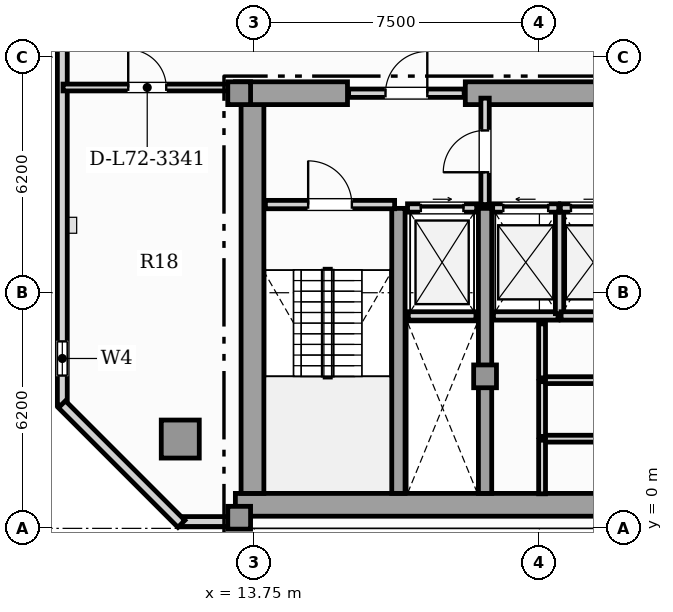
"""IFC4 building model, lengths in metres.
Left out: names, types, materials, properties, quantities, classifications, styles, units other than length and angle.
Written with IfcOpenShell. Run it as: python <this file> out.ifc"""

import sys

from ifc_helpers import new_model, si_unit, direction, frame, frame_2d, origin, origin_2d, place, context, subcontext, project, spatial, rectangle, hollow_rectangle, extrude, element, fill, save


model = new_model("IFC4")
c1 = context("Model", 3, precision=1e-05, world=origin(), true_north=direction((0.0, 1.0)))
c2 = subcontext(c1, "Body", "Model", "MODEL_VIEW")
j1 = project(units=[si_unit("LENGTHUNIT", "METRE"), si_unit("PLANEANGLEUNIT", "RADIAN")], contexts=[c1])
p1 = place(None, origin())
s1 = spatial("IfcSite", under=j1, at=p1, CompositionType="ELEMENT")
p2 = place(p1, origin())
s2 = spatial("IfcBuilding", under=s1, at=p2, CompositionType="ELEMENT")
p3 = place(p2, frame((0.0, 0.0, 292.6)))
s3 = spatial("IfcBuildingStorey", under=s2, at=p3, CompositionType="ELEMENT", Elevation=292.6)
p4 = place(p3, frame((13.25, 0.62, 0.0), z_axis=(0.0, 0.0, 1.0), x_axis=(1.0, 0.0, 0.0)))
e1 = element("IfcWall", 1, at=p4, inside=s3, PredefinedType="SHEAR", context=c2, shape_type="SweptSolid", body=[
    extrude(rectangle(XDim=31.0, YDim=0.6, at=frame_2d((15.5, 0.0))), origin(), (0.0, 0.0, 1.0), 3.65),
])
p5 = place(p3, frame((13.7, 0.92, 0.0), z_axis=(0.0, 0.0, 1.0), x_axis=(0.0, 1.0, 0.0)))
e2 = element("IfcWall", 2, at=p5, inside=s3, PredefinedType="SHEAR", context=c2, shape_type="SweptSolid", body=[
    extrude(rectangle(XDim=10.53, YDim=0.6, at=frame_2d((5.265, 0.0))), origin(), (0.0, 0.0, 1.0), 3.65),
])
p6 = place(p3, frame((13.25, 11.45, 0.0), z_axis=(0.0, 0.0, 1.0), x_axis=(1.0, 0.0, 0.0)))
e3 = element("IfcWall", 3, at=p6, inside=s3, PredefinedType="SHEAR", context=c2, shape_type="SweptSolid", body=[
    extrude(rectangle(XDim=2.95, YDim=0.6, at=frame_2d((1.475, 0.0))), origin(), (0.0, 0.0, 1.0), 3.65),
])
p7 = place(p3, frame((19.3, 11.45, 0.0), z_axis=(0.0, 0.0, 1.0), x_axis=(1.0, 0.0, 0.0)))
e4 = element("IfcWall", 4, at=p7, inside=s3, PredefinedType="SHEAR", context=c2, shape_type="SweptSolid", body=[
    extrude(rectangle(XDim=7.3, YDim=0.6, at=frame_2d((3.65, 0.0))), origin(), (0.0, 0.0, 1.0), 3.65),
])
for number, where, z_axis, x_axis in (
    (5, (17.54, 0.92, 0.0), (0.0, 0.0, 1.0), (0.0, 1.0, 0.0)),
    (6, (19.82, 0.92, 0.0), (0.0, 0.0, 1.0), (0.0, 1.0, 0.0)),
):
    element("IfcWall", number, at=place(p3, frame(where, z_axis=z_axis, x_axis=x_axis)), inside=s3, PredefinedType="SHEAR", context=c2, shape_type="SweptSolid", body=[
        extrude(rectangle(XDim=7.5, YDim=0.35, at=frame_2d((3.75, 0.0))), origin(), (0.0, 0.0, 1.0), 3.65),
    ])
for number, where, z_axis, x_axis in (
    (7, (13.35, 0.28, 0.0), (0.0, 0.0, 1.0), (1.0, 0.0, 0.0)),
    (8, (13.35, 11.45, 0.0), (0.0, 0.0, 1.0), (1.0, 0.0, 0.0)),
    (9, (19.82, 4.0, 0.0), (0.0, 0.0, 1.0), (1.0, 0.0, 0.0)),
):
    element("IfcColumn", number, at=place(p3, frame(where, z_axis=z_axis, x_axis=x_axis)), inside=s3, PredefinedType="COLUMN", context=c2, shape_type="SweptSolid", body=[
        extrude(rectangle(XDim=0.6, YDim=0.6, at=origin_2d()), origin(), (0.0, 0.0, 1.0), 3.85),
    ])
p8 = place(p3, frame((11.8, 2.35, 0.0), z_axis=(0.0, 0.0, 1.0), x_axis=(1.0, 0.0, 0.0)))
e10 = element("IfcColumn", 10, at=p8, inside=s3, PredefinedType="USERDEFINED", context=c2, shape_type="SweptSolid", body=[
    extrude(hollow_rectangle(XDim=1.0, YDim=1.0, WallThickness=0.06, at=origin_2d()), origin(), (0.0, 0.0, 1.0), 3.85),
])
p9 = place(p3, frame((11.806, 0.18, 0.0), z_axis=(0.0, 0.0, 1.0), x_axis=(1.0, 0.0, 0.0)))
e11 = element("IfcWall", 11, at=p9, inside=s3, PredefinedType="SOLIDWALL", context=c2, shape_type="SweptSolid", body=[
    extrude(rectangle(XDim=1.444, YDim=0.26, at=frame_2d((0.722, 0.0))), origin(), (0.0, 0.0, 1.0), 3.65),
])
p10 = place(p3, frame((8.696, 16.718, 0.0), z_axis=(0.0, 0.0, 1.0), x_axis=(0.0, -1.0, 0.0)))
e12 = element("IfcWall", 12, at=p10, inside=s3, PredefinedType="SOLIDWALL", context=c2, shape_type="SweptSolid", body=[
    extrude(rectangle(XDim=13.478, YDim=0.26, at=frame_2d((6.739, 0.0))), origin(), (0.0, 0.0, 1.0), 3.65),
])
p11 = place(p10, frame((11.798, 0.0, 0.95)))
e13 = element("IfcOpeningElement", 13, at=p11, cuts=e12, PredefinedType="OPENING", context=c2, shape_type="SweptSolid", body=[
    extrude(rectangle(XDim=0.9, YDim=1.5, at=frame_2d((0.45, 0.75))), frame((0.0, 0.14, 0.0), z_axis=(0.0, -1.0, 0.0), x_axis=(1.0, 0.0, 0.0)), (0.0, 0.0, 1.0), 0.28),
])
p12 = place(p3, frame((8.687, 3.264, 0.0), z_axis=(0.0, 0.0, 1.0), x_axis=(0.707106781187, -0.707106781187, 0.0)))
e14 = element("IfcWall", 14, at=p12, inside=s3, PredefinedType="SOLIDWALL", context=c2, shape_type="SweptSolid", body=[
    extrude(rectangle(XDim=4.446, YDim=0.26, at=frame_2d((2.223, 0.0))), origin(), (0.0, 0.0, 1.0), 3.65),
])
p13 = place(p3, frame((17.8, 5.59, 0.0), z_axis=(0.0, 0.0, 1.0), x_axis=(1.0, 0.0, 0.0)))
e15 = element("IfcWall", 15, at=p13, inside=s3, PredefinedType="SOLIDWALL", context=c2, shape_type="SweptSolid", body=[
    extrude(rectangle(XDim=1.78, YDim=0.22, at=frame_2d((0.89, 0.0))), origin(), (0.0, 0.0, 1.0), 3.65),
])
p14 = place(p3, frame((17.78, 8.43, 0.0), z_axis=(0.0, 0.0, 1.0), x_axis=(1.0, 0.0, 0.0)))
e16 = element("IfcWall", 16, at=p14, inside=s3, PredefinedType="SOLIDWALL", context=c2, shape_type="SweptSolid", body=[
    extrude(rectangle(XDim=1.82, YDim=0.22, at=frame_2d((0.91, 0.0))), origin(), (0.0, 0.0, 1.0), 3.65),
])
p15 = place(p14, frame((0.35, 0.0, 0.0)))
e17 = element("IfcOpeningElement", 17, at=p15, cuts=e16, PredefinedType="OPENING", context=c2, shape_type="SweptSolid", body=[
    extrude(rectangle(XDim=1.12, YDim=2.25, at=frame_2d((0.56, 1.125))), frame((0.0, 0.12, 0.0), z_axis=(0.0, -1.0, 0.0), x_axis=(1.0, 0.0, 0.0)), (0.0, 0.0, 1.0), 0.24),
])
p16 = place(p3, frame((20.04, 5.59, 0.0), z_axis=(0.0, 0.0, 1.0), x_axis=(1.0, 0.0, 0.0)))
e18 = element("IfcWall", 18, at=p16, inside=s3, PredefinedType="SOLIDWALL", context=c2, shape_type="SweptSolid", body=[
    extrude(rectangle(XDim=1.7, YDim=0.22, at=frame_2d((0.85, 0.0))), origin(), (0.0, 0.0, 1.0), 3.65),
])
p17 = place(p3, frame((21.78, 5.65, 0.0), z_axis=(0.0, 0.0, 1.0), x_axis=(0.0, 1.0, 0.0)))
e19 = element("IfcWall", 19, at=p17, inside=s3, PredefinedType="SOLIDWALL", context=c2, shape_type="SweptSolid", body=[
    extrude(rectangle(XDim=2.7, YDim=0.22, at=frame_2d((1.35, 0.0))), origin(), (0.0, 0.0, 1.0), 3.65),
])
p18 = place(p3, frame((20.02, 8.43, 0.0), z_axis=(0.0, 0.0, 1.0), x_axis=(1.0, 0.0, 0.0)))
e20 = element("IfcWall", 20, at=p18, inside=s3, PredefinedType="SOLIDWALL", context=c2, shape_type="SweptSolid", body=[
    extrude(rectangle(XDim=1.74, YDim=0.22, at=frame_2d((0.87, 0.0))), origin(), (0.0, 0.0, 1.0), 3.65),
])
p19 = place(p18, frame((0.28, 0.0, 0.0)))
e21 = element("IfcOpeningElement", 21, at=p19, cuts=e20, PredefinedType="OPENING", context=c2, shape_type="SweptSolid", body=[
    extrude(rectangle(XDim=1.18, YDim=2.2, at=frame_2d((0.59, 1.1))), frame((0.0, 0.12, 0.0), z_axis=(0.0, -1.0, 0.0), x_axis=(1.0, 0.0, 0.0)), (0.0, 0.0, 1.0), 0.24),
])
p20 = place(p3, frame((21.82, 5.59, 0.0), z_axis=(0.0, 0.0, 1.0), x_axis=(1.0, 0.0, 0.0)))
e22 = element("IfcWall", 22, at=p20, inside=s3, PredefinedType="SOLIDWALL", context=c2, shape_type="SweptSolid", body=[
    extrude(rectangle(XDim=1.7, YDim=0.22, at=frame_2d((0.85, 0.0))), origin(), (0.0, 0.0, 1.0), 3.65),
])
p21 = place(p3, frame((21.8, 8.43, 0.0), z_axis=(0.0, 0.0, 1.0), x_axis=(1.0, 0.0, 0.0)))
e23 = element("IfcWall", 23, at=p21, inside=s3, PredefinedType="SOLIDWALL", context=c2, shape_type="SweptSolid", body=[
    extrude(rectangle(XDim=1.74, YDim=0.22, at=frame_2d((0.87, 0.0))), origin(), (0.0, 0.0, 1.0), 3.65),
])
p22 = place(p21, frame((0.28, 0.0, 0.0)))
e24 = element("IfcOpeningElement", 24, at=p22, cuts=e23, PredefinedType="OPENING", context=c2, shape_type="SweptSolid", body=[
    extrude(rectangle(XDim=1.18, YDim=2.2, at=frame_2d((0.59, 1.1))), frame((0.0, 0.12, 0.0), z_axis=(0.0, -1.0, 0.0), x_axis=(1.0, 0.0, 0.0)), (0.0, 0.0, 1.0), 0.24),
])
p23 = place(p3, frame((14.04, 8.52, 0.0), z_axis=(0.0, 0.0, 1.0), x_axis=(1.0, 0.0, 0.0)))
e25 = element("IfcWall", 25, at=p23, inside=s3, PredefinedType="SOLIDWALL", context=c2, shape_type="SweptSolid", body=[
    extrude(rectangle(XDim=3.4, YDim=0.22, at=frame_2d((1.7, 0.0))), origin(), (0.0, 0.0, 1.0), 3.65),
])
p24 = place(p23, frame((1.125, 0.0, 0.0)))
e26 = element("IfcOpeningElement", 26, at=p24, cuts=e25, PredefinedType="OPENING", context=c2, shape_type="SweptSolid", body=[
    extrude(rectangle(XDim=1.15, YDim=2.2, at=frame_2d((0.575, 1.1))), frame((0.0, 0.12, 0.0), z_axis=(0.0, -1.0, 0.0), x_axis=(1.0, 0.0, 0.0)), (0.0, 0.0, 1.0), 0.24),
])
p25 = place(p3, frame((19.82, 8.52, 0.0), z_axis=(0.0, 0.0, 1.0), x_axis=(0.0, 1.0, 0.0)))
e27 = element("IfcWall", 27, at=p25, inside=s3, PredefinedType="SOLIDWALL", context=c2, shape_type="SweptSolid", body=[
    extrude(rectangle(XDim=2.8, YDim=0.22, at=frame_2d((1.4, 0.0))), origin(), (0.0, 0.0, 1.0), 3.105),
])
p26 = place(p25, frame((0.85, 0.0, 0.0)))
e28 = element("IfcOpeningElement", 28, at=p26, cuts=e27, PredefinedType="OPENING", context=c2, shape_type="SweptSolid", body=[
    extrude(rectangle(XDim=1.1, YDim=2.2, at=frame_2d((0.55, 1.1))), frame((0.0, 0.12, 0.0), z_axis=(0.0, -1.0, 0.0), x_axis=(1.0, 0.0, 0.0)), (0.0, 0.0, 1.0), 0.24),
])
p27 = place(p3, frame((16.23, 11.45, 0.0), z_axis=(0.0, 0.0, 1.0), x_axis=(1.0, 0.0, 0.0)))
e29 = element("IfcWall", 29, at=p27, inside=s3, PredefinedType="SOLIDWALL", context=c2, shape_type="SweptSolid", body=[
    extrude(rectangle(XDim=3.04, YDim=0.22, at=frame_2d((1.52, 0.0))), origin(), (0.0, 0.0, 1.0), 3.65),
])
p28 = place(p27, frame((0.97, 0.0, 0.0)))
e30 = element("IfcOpeningElement", 30, at=p28, cuts=e29, PredefinedType="OPENING", context=c2, shape_type="SweptSolid", body=[
    extrude(rectangle(XDim=1.1, YDim=2.2, at=frame_2d((0.55, 1.1))), frame((0.0, 0.12, 0.0), z_axis=(0.0, -1.0, 0.0), x_axis=(1.0, 0.0, 0.0)), (0.0, 0.0, 1.0), 0.24),
])
p29 = place(p3, frame((21.36, 2.36, 0.0), z_axis=(0.0, 0.0, 1.0), x_axis=(1.0, 0.0, 0.0)))
e31 = element("IfcWall", 31, at=p29, inside=s3, PredefinedType="PARTITIONING", context=c2, shape_type="SweptSolid", body=[
    extrude(rectangle(XDim=3.94, YDim=0.18, at=frame_2d((1.97, 0.0))), origin(), (0.0, 0.0, 1.0), 3.65),
])
p30 = place(p3, frame((21.32, 0.91, 0.0), z_axis=(0.0, 0.0, 1.0), x_axis=(0.0, 1.0, 0.0)))
e32 = element("IfcWall", 32, at=p30, inside=s3, PredefinedType="PARTITIONING", context=c2, shape_type="SweptSolid", body=[
    extrude(rectangle(XDim=1.41, YDim=0.18, at=frame_2d((0.705, 0.0))), origin(), (0.0, 0.0, 1.0), 3.65),
])
p31 = place(p3, frame((21.36, 3.9, 0.0), z_axis=(0.0, 0.0, 1.0), x_axis=(1.0, 0.0, 0.0)))
e33 = element("IfcWall", 33, at=p31, inside=s3, PredefinedType="PARTITIONING", context=c2, shape_type="SweptSolid", body=[
    extrude(rectangle(XDim=3.94, YDim=0.18, at=frame_2d((1.97, 0.0))), origin(), (0.0, 0.0, 1.0), 3.65),
])
p32 = place(p3, frame((21.32, 2.42, 0.0), z_axis=(0.0, 0.0, 1.0), x_axis=(0.0, 1.0, 0.0)))
e34 = element("IfcWall", 34, at=p32, inside=s3, PredefinedType="PARTITIONING", context=c2, shape_type="SweptSolid", body=[
    extrude(rectangle(XDim=1.44, YDim=0.18, at=frame_2d((0.72, 0.0))), origin(), (0.0, 0.0, 1.0), 3.65),
])
p33 = place(p3, frame((21.32, 3.96, 0.0), z_axis=(0.0, 0.0, 1.0), x_axis=(0.0, 1.0, 0.0)))
e35 = element("IfcWall", 35, at=p33, inside=s3, PredefinedType="PARTITIONING", context=c2, shape_type="SweptSolid", body=[
    extrude(rectangle(XDim=1.42, YDim=0.18, at=frame_2d((0.71, 0.0))), origin(), (0.0, 0.0, 1.0), 3.65),
])
p34 = place(p3, frame((8.716, 11.6, 0.0), z_axis=(0.0, 0.0, 1.0), x_axis=(1.0, 0.0, 0.0)))
e36 = element("IfcWall", 36, at=p34, inside=s3, PredefinedType="PARTITIONING", context=c2, shape_type="SweptSolid", body=[
    extrude(rectangle(XDim=4.429, YDim=0.18, at=frame_2d((2.215, 0.0))), origin(), (0.0, 0.0, 1.0), 3.65),
])
p35 = place(p34, frame((1.715, 0.0, 0.0)))
e37 = element("IfcOpeningElement", 37, at=p35, cuts=e36, PredefinedType="OPENING", context=c2, shape_type="SweptSolid", body=[
    extrude(rectangle(XDim=1.0, YDim=2.15, at=frame_2d((0.5, 1.075))), frame((0.0, 0.1, 0.0), z_axis=(0.0, -1.0, 0.0), x_axis=(1.0, 0.0, 0.0)), (0.0, 0.0, 1.0), 0.2),
])
p36 = place(p11, origin())
e38 = element("IfcWindow", 38, at=p36, inside=s3, PartitioningType="SINGLE_PANEL", PredefinedType="WINDOW", context=c2, shape_type="SweptSolid", body=[
    extrude(rectangle(XDim=0.9, YDim=1.5, at=frame_2d((0.45, 0.75))), frame((0.0, 0.03, 0.0), z_axis=(0.0, -1.0, 0.0), x_axis=(1.0, 0.0, 0.0)), (0.0, 0.0, 1.0), 0.06),
])
fill(e13, e38)
p37 = place(p15, origin())
e39 = element("IfcDoor", 39, at=p37, inside=s3, OperationType="SLIDING_TO_RIGHT", PredefinedType="DOOR", context=c2, shape_type="SweptSolid", body=[
    extrude(rectangle(XDim=1.12, YDim=2.25, at=frame_2d((0.56, 1.125))), frame((0.0, 0.025, 0.0), z_axis=(0.0, -1.0, 0.0), x_axis=(1.0, 0.0, 0.0)), (0.0, 0.0, 1.0), 0.05),
])
fill(e17, e39)
p38 = place(p19, origin())
e40 = element("IfcDoor", 40, at=p38, inside=s3, OperationType="SLIDING_TO_LEFT", PredefinedType="DOOR", context=c2, shape_type="SweptSolid", body=[
    extrude(rectangle(XDim=1.18, YDim=2.2, at=frame_2d((0.59, 1.1))), frame((0.0, 0.025, 0.0), z_axis=(0.0, -1.0, 0.0), x_axis=(1.0, 0.0, 0.0)), (0.0, 0.0, 1.0), 0.05),
])
fill(e21, e40)
p39 = place(p22, origin())
e41 = element("IfcDoor", 41, at=p39, inside=s3, OperationType="SLIDING_TO_RIGHT", PredefinedType="DOOR", context=c2, shape_type="SweptSolid", body=[
    extrude(rectangle(XDim=1.18, YDim=2.2, at=frame_2d((0.59, 1.1))), frame((0.0, 0.025, 0.0), z_axis=(0.0, -1.0, 0.0), x_axis=(1.0, 0.0, 0.0)), (0.0, 0.0, 1.0), 0.05),
])
fill(e24, e41)
p40 = place(p24, origin())
e42 = element("IfcDoor", 42, at=p40, inside=s3, OperationType="SINGLE_SWING_LEFT", PredefinedType="DOOR", context=c2, shape_type="SweptSolid", body=[
    extrude(rectangle(XDim=1.15, YDim=2.2, at=frame_2d((0.575, 1.1))), frame((0.0, 0.025, 0.0), z_axis=(0.0, -1.0, 0.0), x_axis=(1.0, 0.0, 0.0)), (0.0, 0.0, 1.0), 0.05),
])
fill(e26, e42)
p41 = place(p26, origin())
e43 = element("IfcDoor", 43, at=p41, inside=s3, OperationType="SINGLE_SWING_LEFT", PredefinedType="DOOR", context=c2, shape_type="SweptSolid", body=[
    extrude(rectangle(XDim=1.1, YDim=2.2, at=frame_2d((0.55, 1.1))), frame((0.0, 0.025, 0.0), z_axis=(0.0, -1.0, 0.0), x_axis=(1.0, 0.0, 0.0)), (0.0, 0.0, 1.0), 0.05),
])
fill(e28, e43)
p42 = place(p28, origin())
e44 = element("IfcDoor", 44, at=p42, inside=s3, OperationType="SINGLE_SWING_RIGHT", PredefinedType="DOOR", context=c2, shape_type="SweptSolid", body=[
    extrude(rectangle(XDim=1.1, YDim=2.2, at=frame_2d((0.55, 1.1))), frame((0.0, 0.025, 0.0), z_axis=(0.0, -1.0, 0.0), x_axis=(1.0, 0.0, 0.0)), (0.0, 0.0, 1.0), 0.05),
])
fill(e30, e44)
p43 = place(p35, origin())
e45 = element("IfcDoor", 45, at=p43, inside=s3, OperationType="SINGLE_SWING_LEFT", PredefinedType="DOOR", context=c2, shape_type="SweptSolid", body=[
    extrude(rectangle(XDim=1.0, YDim=2.15, at=frame_2d((0.5, 1.075))), frame((0.0, 0.025, 0.0), z_axis=(0.0, -1.0, 0.0), x_axis=(1.0, 0.0, 0.0)), (0.0, 0.0, 1.0), 0.05),
])
fill(e37, e45)
save(model, sys.argv[1])
